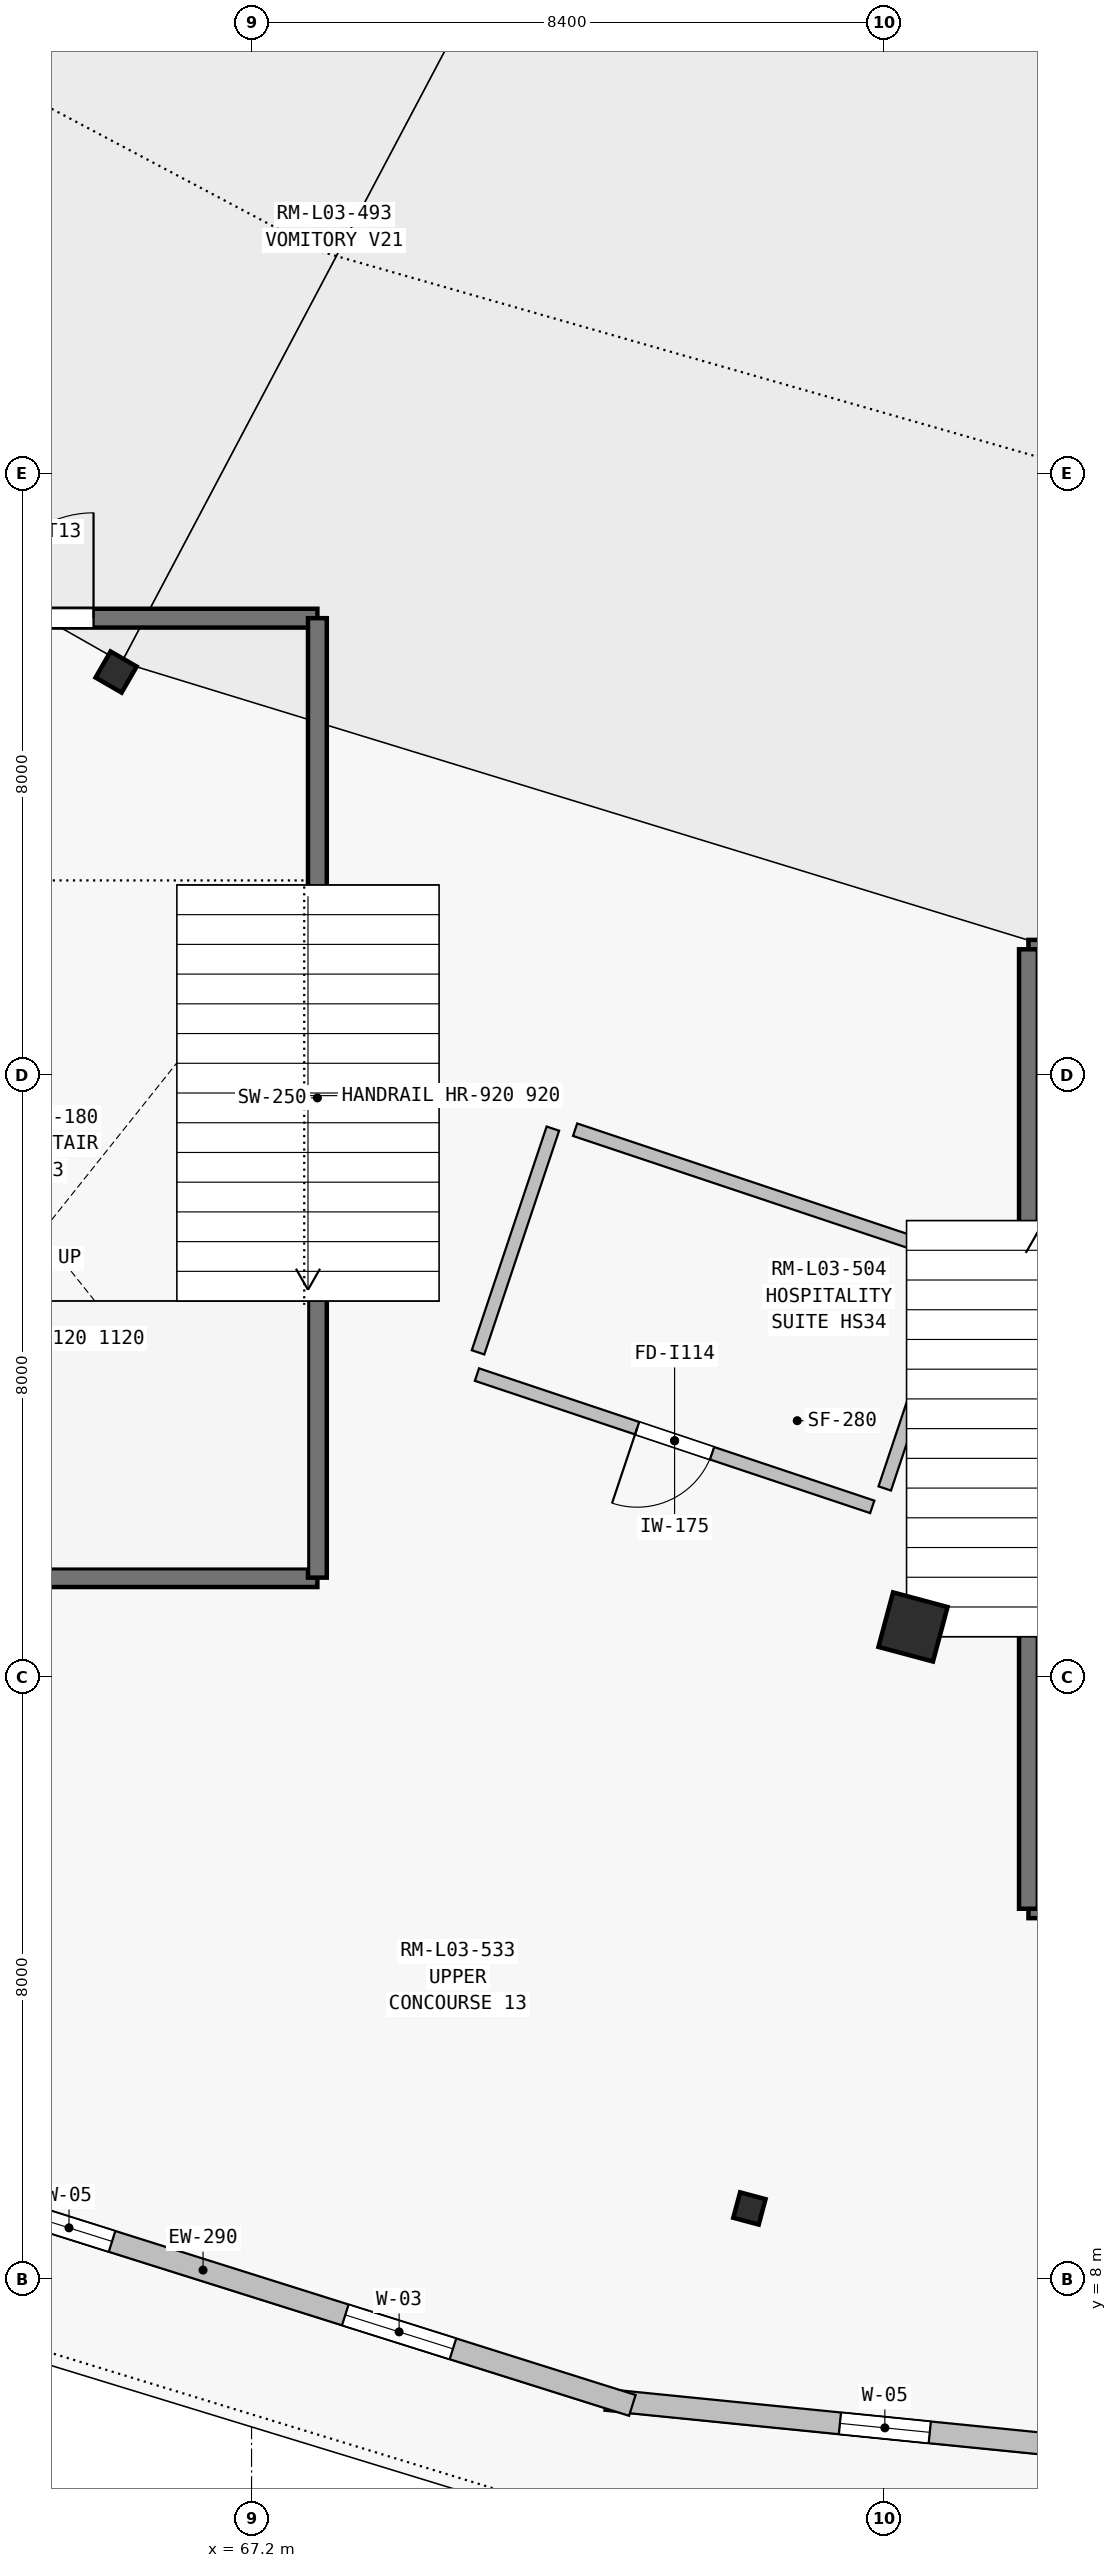
"""IFC4 building model, lengths in metres.
Left out: names, types, materials, properties, quantities, classifications, styles, units other than length and angle.
Written with IfcOpenShell. Run it as: python <this file> out.ifc"""

import sys

from ifc_helpers import new_model, si_unit, direction, frame, frame_2d, origin, origin_2d, place, context, subcontext, project, spatial, rectangle, i_section, extrude, element, fill, save


model = new_model("IFC4")
c1 = context("Model", 3, precision=1e-05, world=origin(), true_north=direction((0.0, 1.0)))
c2 = subcontext(c1, "Body", "Model", "MODEL_VIEW")
j1 = project(units=[si_unit("LENGTHUNIT", "METRE"), si_unit("PLANEANGLEUNIT", "RADIAN")], contexts=[c1])
p1 = place(None, origin())
s1 = spatial("IfcSite", under=j1, at=p1, CompositionType="ELEMENT")
p2 = place(p1, origin())
s2 = spatial("IfcBuilding", under=s1, at=p2, CompositionType="ELEMENT")
p3 = place(p2, frame((0.0, 0.0, 14.4)))
s3 = spatial("IfcBuildingStorey", under=s2, at=p3, CompositionType="ELEMENT", Elevation=14.4)
p4 = place(p3, frame((65.4, 29.359, 0.0), z_axis=(0.0, 0.0, 1.0), x_axis=(-0.5, -0.866025403784, 0.0)))
e1 = element("IfcColumn", 1, at=p4, inside=s3, PredefinedType="COLUMN", context=c2, shape_type="SweptSolid", body=[
    extrude(i_section(OverallWidth=0.4, OverallDepth=0.4, WebThickness=0.016, FlangeThickness=0.028, at=origin_2d()), origin(), (0.0, 0.0, 1.0), 4.5),
])
p5 = place(p3, frame((75.991, 16.67, 0.0), z_axis=(0.0, 0.0, 1.0), x_axis=(-0.258819045103, -0.965925826289, 0.0)))
e2 = element("IfcColumn", 2, at=p5, inside=s3, PredefinedType="COLUMN", context=c2, shape_type="SweptSolid", body=[
    extrude(rectangle(XDim=0.75, YDim=0.75, at=origin_2d()), origin(), (0.0, 0.0, 1.0), 4.5),
])
p6 = place(p3, frame((73.817, 8.942, 0.0), z_axis=(0.0, 0.0, 1.0), x_axis=(-0.258819045103, -0.965925826289, 0.0)))
e3 = element("IfcColumn", 3, at=p6, inside=s3, PredefinedType="COLUMN", context=c2, shape_type="SweptSolid", body=[
    extrude(i_section(OverallWidth=0.35, OverallDepth=0.35, WebThickness=0.014, FlangeThickness=0.024, at=origin_2d()), origin(), (0.0, 0.0, 1.0), 4.5),
])
p7 = place(p3, frame((92.582, 4.327, 0.0), z_axis=(0.0, 0.0, 1.0), x_axis=(-0.995020542998, 0.099670050731, 0.0)))
e4 = element("IfcWall", 4, at=p7, inside=s3, PredefinedType="SOLIDWALL", context=c2, shape_type="SweptSolid", body=[
    extrude(rectangle(XDim=20.781, YDim=0.29, at=frame_2d((10.391, 0.0))), origin(), (0.0, 0.0, 1.0), 4.26),
])
p8 = place(p7, frame((2.45, 0.0, 0.9)))
e5 = element("IfcOpeningElement", 5, at=p8, cuts=e4, PredefinedType="OPENING", context=c2, shape_type="SweptSolid", body=[
    extrude(rectangle(XDim=1.6, YDim=1.45, at=frame_2d((0.8, 0.725))), frame((0.0, 0.155, 0.0), z_axis=(0.0, -1.0, 0.0), x_axis=(1.0, 0.0, 0.0)), (0.0, 0.0, 1.0), 0.31),
])
p9 = place(p7, frame((6.95, 0.0, 0.75)))
e6 = element("IfcOpeningElement", 6, at=p9, cuts=e4, PredefinedType="OPENING", context=c2, shape_type="SweptSolid", body=[
    extrude(rectangle(XDim=1.8, YDim=2.4, at=frame_2d((0.9, 1.2))), frame((0.0, 0.155, 0.0), z_axis=(0.0, -1.0, 0.0), x_axis=(1.0, 0.0, 0.0)), (0.0, 0.0, 1.0), 0.31),
])
p10 = place(p7, frame((11.7, 0.0, 0.75)))
e7 = element("IfcOpeningElement", 7, at=p10, cuts=e4, PredefinedType="OPENING", context=c2, shape_type="SweptSolid", body=[
    extrude(rectangle(XDim=1.5, YDim=2.3, at=frame_2d((0.75, 1.15))), frame((0.0, 0.155, 0.0), z_axis=(0.0, -1.0, 0.0), x_axis=(1.0, 0.0, 0.0)), (0.0, 0.0, 1.0), 0.31),
])
p11 = place(p7, frame((16.45, 0.0, 0.75)))
e8 = element("IfcOpeningElement", 8, at=p11, cuts=e4, PredefinedType="OPENING", context=c2, shape_type="SweptSolid", body=[
    extrude(rectangle(XDim=1.2, YDim=2.2, at=frame_2d((0.6, 1.1))), frame((0.0, 0.155, 0.0), z_axis=(0.0, -1.0, 0.0), x_axis=(1.0, 0.0, 0.0)), (0.0, 0.0, 1.0), 0.31),
])
p12 = place(p3, frame((72.261, 6.325, 0.0), z_axis=(0.0, 0.0, 1.0), x_axis=(-0.953756113153, 0.30058156401, 0.0)))
e9 = element("IfcWall", 9, at=p12, inside=s3, PredefinedType="SOLIDWALL", context=c2, shape_type="SweptSolid", body=[
    extrude(rectangle(XDim=20.212, YDim=0.29, at=frame_2d((10.106, 0.0))), origin(), (0.0, 0.0, 1.0), 4.26),
])
p13 = place(p12, frame((2.5, 0.0, 0.75)))
e10 = element("IfcOpeningElement", 10, at=p13, cuts=e9, PredefinedType="OPENING", context=c2, shape_type="SweptSolid", body=[
    extrude(rectangle(XDim=1.5, YDim=2.3, at=frame_2d((0.75, 1.15))), frame((0.0, 0.155, 0.0), z_axis=(0.0, -1.0, 0.0), x_axis=(1.0, 0.0, 0.0)), (0.0, 0.0, 1.0), 0.31),
])
p14 = place(p12, frame((7.25, 0.0, 0.75)))
e11 = element("IfcOpeningElement", 11, at=p14, cuts=e9, PredefinedType="OPENING", context=c2, shape_type="SweptSolid", body=[
    extrude(rectangle(XDim=1.2, YDim=2.2, at=frame_2d((0.6, 1.1))), frame((0.0, 0.155, 0.0), z_axis=(0.0, -1.0, 0.0), x_axis=(1.0, 0.0, 0.0)), (0.0, 0.0, 1.0), 0.31),
])
p15 = place(p12, frame((11.325, 0.0, 0.9)))
e12 = element("IfcOpeningElement", 12, at=p15, cuts=e9, PredefinedType="OPENING", context=c2, shape_type="SweptSolid", body=[
    extrude(rectangle(XDim=2.25, YDim=2.1, at=frame_2d((1.125, 1.05))), frame((0.0, 0.155, 0.0), z_axis=(0.0, -1.0, 0.0), x_axis=(1.0, 0.0, 0.0)), (0.0, 0.0, 1.0), 0.31),
])
p16 = place(p12, frame((16.075, 0.0, 0.9)))
e13 = element("IfcOpeningElement", 13, at=p16, cuts=e9, PredefinedType="OPENING", context=c2, shape_type="SweptSolid", body=[
    extrude(rectangle(XDim=1.95, YDim=2.0, at=frame_2d((0.975, 1.0))), frame((0.0, 0.155, 0.0), z_axis=(0.0, -1.0, 0.0), x_axis=(1.0, 0.0, 0.0)), (0.0, 0.0, 1.0), 0.31),
])
p17 = place(p3, frame((60.725, 17.325, 0.0), z_axis=(0.0, 0.0, 1.0), x_axis=(1.0, 0.0, 0.0)))
e14 = element("IfcWall", 14, at=p17, inside=s3, PredefinedType="SHEAR", context=c2, shape_type="SweptSolid", body=[
    extrude(rectangle(XDim=7.35, YDim=0.25, at=frame_2d((3.675, 0.0))), origin(), (0.0, 0.0, 1.0), 4.5),
])
p18 = place(p3, frame((60.725, 30.075, 0.0), z_axis=(0.0, 0.0, 1.0), x_axis=(1.0, 0.0, 0.0)))
e15 = element("IfcWall", 15, at=p18, inside=s3, PredefinedType="SHEAR", context=c2, shape_type="SweptSolid", body=[
    extrude(rectangle(XDim=7.35, YDim=0.25, at=frame_2d((3.675, 0.0))), origin(), (0.0, 0.0, 1.0), 4.5),
])
p19 = place(p18, frame((2.975, 0.0, 0.0)))
e16 = element("IfcOpeningElement", 16, at=p19, cuts=e15, PredefinedType="OPENING", context=c2, shape_type="SweptSolid", body=[
    extrude(rectangle(XDim=1.4, YDim=2.2, at=frame_2d((0.7, 1.1))), frame((0.0, 0.135, 0.0), z_axis=(0.0, -1.0, 0.0), x_axis=(1.0, 0.0, 0.0)), (0.0, 0.0, 1.0), 0.27),
])
p20 = place(p3, frame((68.075, 17.325, 0.0), z_axis=(0.0, 0.0, 1.0), x_axis=(0.0, 1.0, 0.0)))
e17 = element("IfcWall", 17, at=p20, inside=s3, PredefinedType="SHEAR", context=c2, shape_type="SweptSolid", body=[
    extrude(rectangle(XDim=12.75, YDim=0.25, at=frame_2d((6.375, 0.0))), origin(), (0.0, 0.0, 1.0), 4.5),
])
p21 = place(p3, frame((77.525, 12.925, 0.0), z_axis=(0.0, 0.0, 1.0), x_axis=(1.0, 0.0, 0.0)))
e18 = element("IfcWall", 18, at=p21, inside=s3, PredefinedType="SHEAR", context=c2, shape_type="SweptSolid", body=[
    extrude(rectangle(XDim=7.35, YDim=0.25, at=frame_2d((3.675, 0.0))), origin(), (0.0, 0.0, 1.0), 4.5),
])
p22 = place(p3, frame((77.525, 25.675, 0.0), z_axis=(0.0, 0.0, 1.0), x_axis=(1.0, 0.0, 0.0)))
e19 = element("IfcWall", 19, at=p22, inside=s3, PredefinedType="SHEAR", context=c2, shape_type="SweptSolid", body=[
    extrude(rectangle(XDim=7.35, YDim=0.25, at=frame_2d((3.675, 0.0))), origin(), (0.0, 0.0, 1.0), 4.5),
])
p23 = place(p22, frame((3.015, 0.0, 0.0)))
e20 = element("IfcOpeningElement", 20, at=p23, cuts=e19, PredefinedType="OPENING", context=c2, shape_type="SweptSolid", body=[
    extrude(rectangle(XDim=1.32, YDim=2.2, at=frame_2d((0.66, 1.1))), frame((0.0, 0.135, 0.0), z_axis=(0.0, -1.0, 0.0), x_axis=(1.0, 0.0, 0.0)), (0.0, 0.0, 1.0), 0.27),
])
p24 = place(p3, frame((77.525, 12.925, 0.0), z_axis=(0.0, 0.0, 1.0), x_axis=(0.0, 1.0, 0.0)))
e21 = element("IfcWall", 21, at=p24, inside=s3, PredefinedType="SHEAR", context=c2, shape_type="SweptSolid", body=[
    extrude(rectangle(XDim=12.75, YDim=0.25, at=frame_2d((6.375, 0.0))), origin(), (0.0, 0.0, 1.0), 4.5),
])
p25 = place(p3, frame((75.449, 18.265, 0.0), z_axis=(0.0, 0.0, 1.0), x_axis=(-0.948325732887, 0.317298446804, 0.0)))
e22 = element("IfcWall", 22, at=p25, inside=s3, PredefinedType="PARTITIONING", context=c2, shape_type="SweptSolid", body=[
    extrude(rectangle(XDim=5.54, YDim=0.175, at=frame_2d((2.77, 0.0))), origin(), (0.0, 0.0, 1.0), 4.2),
])
p26 = place(p25, frame((2.245, 0.0, 0.0)))
e23 = element("IfcOpeningElement", 23, at=p26, cuts=e22, PredefinedType="OPENING", context=c2, shape_type="SweptSolid", body=[
    extrude(rectangle(XDim=1.05, YDim=2.25, at=frame_2d((0.525, 1.125))), frame((0.0, 0.097, 0.0), z_axis=(0.0, -1.0, 0.0), x_axis=(1.0, 0.0, 0.0)), (0.0, 0.0, 1.0), 0.195),
])
p27 = place(p3, frame((70.21, 20.319, 0.0), z_axis=(0.0, 0.0, 1.0), x_axis=(0.317255506917, 0.948340098979, 0.0)))
e24 = element("IfcWall", 24, at=p27, inside=s3, PredefinedType="PARTITIONING", context=c2, shape_type="SweptSolid", body=[
    extrude(rectangle(XDim=3.135, YDim=0.175, at=frame_2d((1.567, 0.0))), origin(), (0.0, 0.0, 1.0), 4.2),
])
p28 = place(p3, frame((71.5, 23.277, 0.0), z_axis=(0.0, 0.0, 1.0), x_axis=(0.94832576744, -0.317298343535, 0.0)))
e25 = element("IfcWall", 25, at=p28, inside=s3, PredefinedType="PARTITIONING", context=c2, shape_type="SweptSolid", body=[
    extrude(rectangle(XDim=5.335, YDim=0.175, at=frame_2d((2.667, 0.0))), origin(), (0.0, 0.0, 1.0), 4.2),
])
p29 = place(p3, frame((76.545, 21.289, 0.0), z_axis=(0.0, 0.0, 1.0), x_axis=(-0.317252319858, -0.948341165164, 0.0)))
e26 = element("IfcWall", 26, at=p29, inside=s3, PredefinedType="PARTITIONING", context=c2, shape_type="SweptSolid", body=[
    extrude(rectangle(XDim=2.93, YDim=0.175, at=frame_2d((1.465, 0.0))), origin(), (0.0, 0.0, 1.0), 4.2),
])
p30 = place(p11, origin())
e27 = element("IfcWindow", 27, at=p30, inside=s3, PartitioningType="SINGLE_PANEL", PredefinedType="WINDOW", context=c2, shape_type="SweptSolid", body=[
    extrude(rectangle(XDim=1.2, YDim=2.2, at=frame_2d((0.6, 1.1))), frame((0.0, 0.03, 0.0), z_axis=(0.0, -1.0, 0.0), x_axis=(1.0, 0.0, 0.0)), (0.0, 0.0, 1.0), 0.06),
])
fill(e8, e27)
p31 = place(p13, origin())
e28 = element("IfcWindow", 28, at=p31, inside=s3, PartitioningType="SINGLE_PANEL", PredefinedType="WINDOW", context=c2, shape_type="SweptSolid", body=[
    extrude(rectangle(XDim=1.5, YDim=2.3, at=frame_2d((0.75, 1.15))), frame((0.0, 0.03, 0.0), z_axis=(0.0, -1.0, 0.0), x_axis=(1.0, 0.0, 0.0)), (0.0, 0.0, 1.0), 0.06),
])
fill(e10, e28)
p32 = place(p14, origin())
e29 = element("IfcWindow", 29, at=p32, inside=s3, PartitioningType="SINGLE_PANEL", PredefinedType="WINDOW", context=c2, shape_type="SweptSolid", body=[
    extrude(rectangle(XDim=1.2, YDim=2.2, at=frame_2d((0.6, 1.1))), frame((0.0, 0.03, 0.0), z_axis=(0.0, -1.0, 0.0), x_axis=(1.0, 0.0, 0.0)), (0.0, 0.0, 1.0), 0.06),
])
fill(e11, e29)
p33 = place(p19, origin())
e30 = element("IfcDoor", 30, at=p33, inside=s3, OperationType="SINGLE_SWING_RIGHT", PredefinedType="DOOR", context=c2, shape_type="SweptSolid", body=[
    extrude(rectangle(XDim=1.4, YDim=2.2, at=frame_2d((0.7, 1.1))), frame((0.0, 0.025, 0.0), z_axis=(0.0, -1.0, 0.0), x_axis=(1.0, 0.0, 0.0)), (0.0, 0.0, 1.0), 0.05),
])
fill(e16, e30)
p34 = place(p26, origin())
e31 = element("IfcDoor", 31, at=p34, inside=s3, OperationType="SINGLE_SWING_RIGHT", PredefinedType="DOOR", context=c2, shape_type="SweptSolid", body=[
    extrude(rectangle(XDim=1.05, YDim=2.25, at=frame_2d((0.525, 1.125))), frame((0.0, 0.025, 0.0), z_axis=(0.0, -1.0, 0.0), x_axis=(1.0, 0.0, 0.0)), (0.0, 0.0, 1.0), 0.05),
])
fill(e23, e31)
save(model, sys.argv[1])
